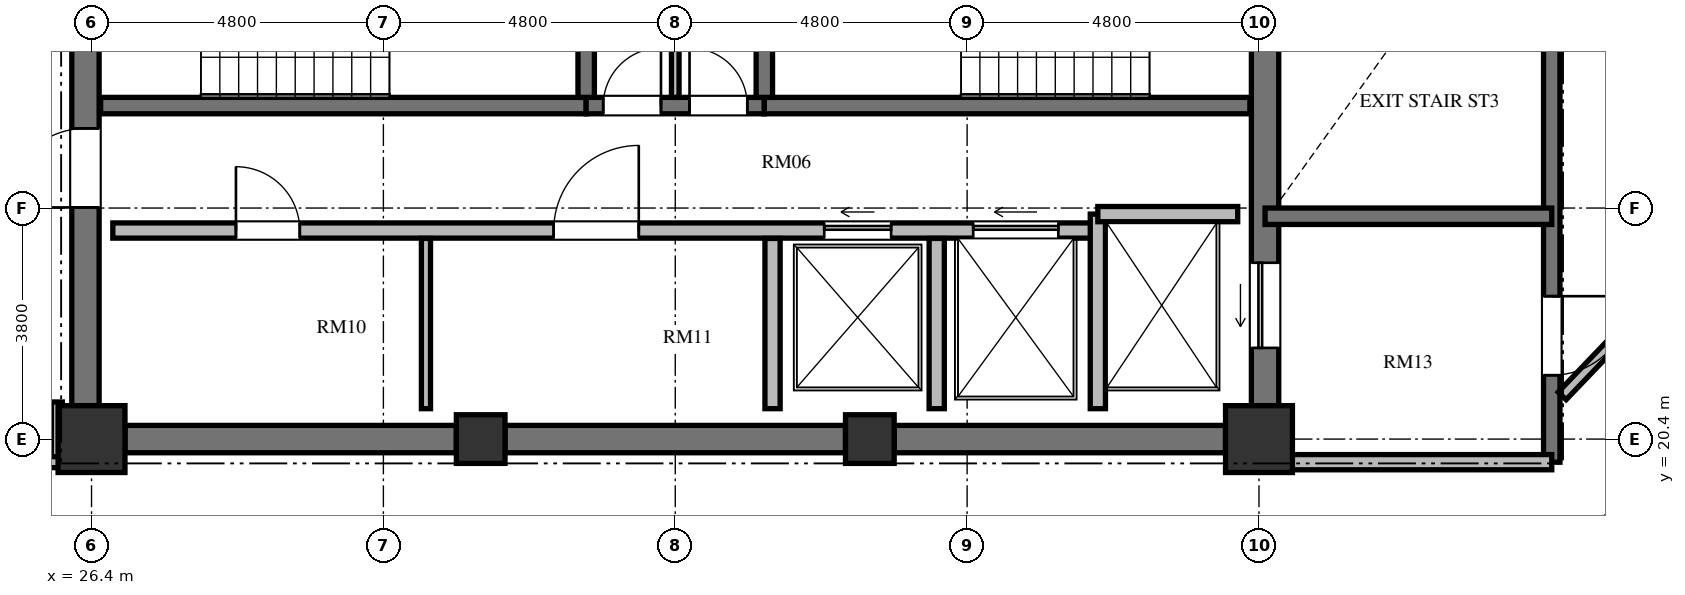
"""IFC4 building model, lengths in metres.
Left out: names, types, materials, properties, quantities, classifications, styles, units other than length and angle.
Written with IfcOpenShell. Run it as: python <this file> out.ifc"""

import sys

from ifc_helpers import new_model, si_unit, direction, frame, frame_2d, origin, origin_2d, place, context, subcontext, project, spatial, rectangle, extrude, element, fill, save


model = new_model("IFC4")
c1 = context("Model", 3, precision=1e-05, world=origin(), true_north=direction((0.0, 1.0)))
c2 = subcontext(c1, "Body", "Model", "MODEL_VIEW")
j1 = project(units=[si_unit("LENGTHUNIT", "METRE"), si_unit("PLANEANGLEUNIT", "RADIAN")], contexts=[c1])
p1 = place(None, origin())
s1 = spatial("IfcSite", under=j1, at=p1, CompositionType="ELEMENT")
p2 = place(p1, origin())
s2 = spatial("IfcBuilding", under=s1, at=p2, CompositionType="ELEMENT")
p3 = place(p2, frame((0.0, 0.0, 231.312)))
s3 = spatial("IfcBuildingStorey", under=s2, at=p3, CompositionType="ELEMENT", Elevation=231.312)
p4 = place(p3, frame((26.4, 20.4, 0.0), z_axis=(0.0, 0.0, 1.0), x_axis=(1.0, 0.0, 0.0)))
e1 = element("IfcColumn", 1, at=p4, inside=s3, PredefinedType="COLUMN", context=c2, shape_type="SweptSolid", body=[
    extrude(rectangle(XDim=1.1, YDim=1.1, at=origin_2d()), origin(), (0.0, 0.0, 1.0), 3.648),
])
for number, where, z_axis, x_axis in (
    (2, (32.8, 20.4, 0.0), (0.0, 0.0, 1.0), (1.0, 0.0, 0.0)),
    (3, (39.2, 20.4, 0.0), (0.0, 0.0, 1.0), (1.0, 0.0, 0.0)),
):
    element("IfcColumn", number, at=place(p3, frame(where, z_axis=z_axis, x_axis=x_axis)), inside=s3, PredefinedType="COLUMN", context=c2, shape_type="SweptSolid", body=[
        extrude(rectangle(XDim=0.8, YDim=0.8, at=origin_2d()), origin(), (0.0, 0.0, 1.0), 3.648),
    ])
p5 = place(p3, frame((45.6, 20.4, 0.0), z_axis=(0.0, 0.0, 1.0), x_axis=(1.0, 0.0, 0.0)))
e4 = element("IfcColumn", 4, at=p5, inside=s3, PredefinedType="COLUMN", context=c2, shape_type="SweptSolid", body=[
    extrude(rectangle(XDim=1.1, YDim=1.1, at=origin_2d()), origin(), (0.0, 0.0, 1.0), 3.648),
])
p6 = place(p3, frame((26.3, 20.95, 0.0), z_axis=(0.0, 0.0, 1.0), x_axis=(0.0, 1.0, 0.0)))
e5 = element("IfcWall", 5, at=p6, inside=s3, PredefinedType="SHEAR", context=c2, shape_type="SweptSolid", body=[
    extrude(rectangle(XDim=14.1, YDim=0.45, at=frame_2d((7.05, 0.0))), origin(), (0.0, 0.0, 1.0), 3.648),
])
p7 = place(p6, frame((6.5, 0.0, 0.0)))
e6 = element("IfcOpeningElement", 6, at=p7, cuts=e5, PredefinedType="OPENING", context=c2, shape_type="SweptSolid", body=[
    extrude(rectangle(XDim=1.2, YDim=2.15, at=frame_2d((0.6, 1.075))), frame((0.0, 0.235, 0.0), z_axis=(0.0, -1.0, 0.0), x_axis=(1.0, 0.0, 0.0)), (0.0, 0.0, 1.0), 0.47),
])
p8 = place(p6, frame((9.6, 0.0, 0.0)))
e7 = element("IfcOpeningElement", 7, at=p8, cuts=e5, PredefinedType="OPENING", context=c2, shape_type="SweptSolid", body=[
    extrude(rectangle(XDim=1.3, YDim=2.2, at=frame_2d((0.65, 1.1))), frame((0.0, 0.235, 0.0), z_axis=(0.0, -1.0, 0.0), x_axis=(1.0, 0.0, 0.0)), (0.0, 0.0, 1.0), 0.47),
])
p9 = place(p6, frame((3.26, 0.0, 0.0)))
e8 = element("IfcOpeningElement", 8, at=p9, cuts=e5, PredefinedType="OPENING", context=c2, shape_type="SweptSolid", body=[
    extrude(rectangle(XDim=1.3, YDim=2.2, at=frame_2d((0.65, 1.1))), frame((0.0, 0.235, 0.0), z_axis=(0.0, -1.0, 0.0), x_axis=(1.0, 0.0, 0.0)), (0.0, 0.0, 1.0), 0.47),
])
p10 = place(p3, frame((45.7, 20.95, 0.0), z_axis=(0.0, 0.0, 1.0), x_axis=(0.0, 1.0, 0.0)))
e9 = element("IfcWall", 9, at=p10, inside=s3, PredefinedType="SHEAR", context=c2, shape_type="SweptSolid", body=[
    extrude(rectangle(XDim=14.1, YDim=0.45, at=frame_2d((7.05, 0.0))), origin(), (0.0, 0.0, 1.0), 3.648),
])
p11 = place(p10, frame((11.75, 0.0, 0.0)))
e10 = element("IfcOpeningElement", 10, at=p11, cuts=e9, PredefinedType="OPENING", context=c2, shape_type="SweptSolid", body=[
    extrude(rectangle(XDim=1.4, YDim=2.3, at=frame_2d((0.7, 1.15))), frame((0.0, 0.235, 0.0), z_axis=(0.0, -1.0, 0.0), x_axis=(1.0, 0.0, 0.0)), (0.0, 0.0, 1.0), 0.47),
])
p12 = place(p10, frame((0.95, 0.0, 0.0)))
e11 = element("IfcOpeningElement", 11, at=p12, cuts=e9, PredefinedType="OPENING", context=c2, shape_type="SweptSolid", body=[
    extrude(rectangle(XDim=1.4, YDim=2.3, at=frame_2d((0.7, 1.15))), frame((0.0, 0.235, 0.0), z_axis=(0.0, -1.0, 0.0), x_axis=(1.0, 0.0, 0.0)), (0.0, 0.0, 1.0), 0.47),
])
p13 = place(p3, frame((26.95, 20.4, 0.0), z_axis=(0.0, 0.0, 1.0), x_axis=(1.0, 0.0, 0.0)))
e12 = element("IfcWall", 12, at=p13, inside=s3, PredefinedType="SHEAR", context=c2, shape_type="SweptSolid", body=[
    extrude(rectangle(XDim=5.45, YDim=0.45, at=frame_2d((2.725, 0.0))), origin(), (0.0, 0.0, 1.0), 3.648),
])
p14 = place(p3, frame((33.2, 20.4, 0.0), z_axis=(0.0, 0.0, 1.0), x_axis=(1.0, 0.0, 0.0)))
e13 = element("IfcWall", 13, at=p14, inside=s3, PredefinedType="SHEAR", context=c2, shape_type="SweptSolid", body=[
    extrude(rectangle(XDim=5.6, YDim=0.45, at=frame_2d((2.8, 0.0))), origin(), (0.0, 0.0, 1.0), 3.648),
])
p15 = place(p3, frame((39.6, 20.4, 0.0), z_axis=(0.0, 0.0, 1.0), x_axis=(1.0, 0.0, 0.0)))
e14 = element("IfcWall", 14, at=p15, inside=s3, PredefinedType="SHEAR", context=c2, shape_type="SweptSolid", body=[
    extrude(rectangle(XDim=5.45, YDim=0.45, at=frame_2d((2.725, 0.0))), origin(), (0.0, 0.0, 1.0), 3.648),
])
p16 = place(p3, frame((26.55, 25.885, 0.0), z_axis=(0.0, 0.0, 1.0), x_axis=(1.0, 0.0, 0.0)))
e15 = element("IfcWall", 15, at=p16, inside=s3, PredefinedType="SHEAR", context=c2, shape_type="SweptSolid", body=[
    extrude(rectangle(XDim=7.985, YDim=0.27, at=frame_2d((3.992, 0.0))), origin(), (0.0, 0.0, 1.0), 3.648),
])
p17 = place(p3, frame((34.535, 25.885, 0.0), z_axis=(0.0, 0.0, 1.0), x_axis=(1.0, 0.0, 0.0)))
e16 = element("IfcWall", 16, at=p17, inside=s3, PredefinedType="SHEAR", context=c2, shape_type="SweptSolid", body=[
    extrude(rectangle(XDim=2.93, YDim=0.27, at=frame_2d((1.465, 0.0))), origin(), (0.0, 0.0, 1.0), 3.648),
])
p18 = place(p17, frame((0.28, 0.0, 0.0)))
e17 = element("IfcOpeningElement", 17, at=p18, cuts=e16, PredefinedType="OPENING", context=c2, shape_type="SweptSolid", body=[
    extrude(rectangle(XDim=0.95, YDim=2.1, at=frame_2d((0.475, 1.05))), frame((0.0, 0.145, 0.0), z_axis=(0.0, -1.0, 0.0), x_axis=(1.0, 0.0, 0.0)), (0.0, 0.0, 1.0), 0.29),
])
p19 = place(p17, frame((1.7, 0.0, 0.0)))
e18 = element("IfcOpeningElement", 18, at=p19, cuts=e16, PredefinedType="OPENING", context=c2, shape_type="SweptSolid", body=[
    extrude(rectangle(XDim=0.95, YDim=2.1, at=frame_2d((0.475, 1.05))), frame((0.0, 0.145, 0.0), z_axis=(0.0, -1.0, 0.0), x_axis=(1.0, 0.0, 0.0)), (0.0, 0.0, 1.0), 0.29),
])
p20 = place(p3, frame((37.465, 25.885, 0.0), z_axis=(0.0, 0.0, 1.0), x_axis=(1.0, 0.0, 0.0)))
e19 = element("IfcWall", 19, at=p20, inside=s3, PredefinedType="SHEAR", context=c2, shape_type="SweptSolid", body=[
    extrude(rectangle(XDim=7.985, YDim=0.27, at=frame_2d((3.992, 0.0))), origin(), (0.0, 0.0, 1.0), 3.648),
])
for number, where, z_axis, x_axis in (
    (20, (34.535, 26.02, 0.0), (0.0, 0.0, 1.0), (0.0, 1.0, 0.0)),
    (21, (37.465, 26.02, 0.0), (0.0, 0.0, 1.0), (0.0, 1.0, 0.0)),
):
    element("IfcWall", number, at=place(p3, frame(where, z_axis=z_axis, x_axis=x_axis)), inside=s3, PredefinedType="SHEAR", context=c2, shape_type="SweptSolid", body=[
        extrude(rectangle(XDim=4.08, YDim=0.27, at=frame_2d((2.04, 0.0))), origin(), (0.0, 0.0, 1.0), 3.648),
    ])
p21 = place(p3, frame((36.0, 26.02, 0.0), z_axis=(0.0, 0.0, 1.0), x_axis=(0.0, 1.0, 0.0)))
e22 = element("IfcWall", 22, at=p21, inside=s3, PredefinedType="PARTITIONING", context=c2, shape_type="SweptSolid", body=[
    extrude(rectangle(XDim=4.08, YDim=0.125, at=frame_2d((2.04, 0.0))), origin(), (0.0, 0.0, 1.0), 3.448),
])
p22 = place(p3, frame((26.75, 23.83, 0.0), z_axis=(0.0, 0.0, 1.0), x_axis=(1.0, 0.0, 0.0)))
e23 = element("IfcWall", 23, at=p22, inside=s3, PredefinedType="SOLIDWALL", context=c2, shape_type="SweptSolid", body=[
    extrude(rectangle(XDim=16.2, YDim=0.25, at=frame_2d((8.1, 0.0))), origin(), (0.0, 0.0, 1.0), 3.448),
])
p23 = place(p22, frame((2.025, 0.0, 0.0)))
e24 = element("IfcOpeningElement", 24, at=p23, cuts=e23, PredefinedType="OPENING", context=c2, shape_type="SweptSolid", body=[
    extrude(rectangle(XDim=1.05, YDim=2.15, at=frame_2d((0.525, 1.075))), frame((0.0, 0.135, 0.0), z_axis=(0.0, -1.0, 0.0), x_axis=(1.0, 0.0, 0.0)), (0.0, 0.0, 1.0), 0.27),
])
p24 = place(p22, frame((7.25, 0.0, 0.0)))
e25 = element("IfcOpeningElement", 25, at=p24, cuts=e23, PredefinedType="OPENING", context=c2, shape_type="SweptSolid", body=[
    extrude(rectangle(XDim=1.4, YDim=2.2, at=frame_2d((0.7, 1.1))), frame((0.0, 0.135, 0.0), z_axis=(0.0, -1.0, 0.0), x_axis=(1.0, 0.0, 0.0)), (0.0, 0.0, 1.0), 0.27),
])
p25 = place(p22, frame((11.7, 0.0, 0.0)))
e26 = element("IfcOpeningElement", 26, at=p25, cuts=e23, PredefinedType="OPENING", context=c2, shape_type="SweptSolid", body=[
    extrude(rectangle(XDim=1.1, YDim=2.2, at=frame_2d((0.55, 1.1))), frame((0.0, 0.135, 0.0), z_axis=(0.0, -1.0, 0.0), x_axis=(1.0, 0.0, 0.0)), (0.0, 0.0, 1.0), 0.27),
])
p26 = place(p22, frame((14.15, 0.0, 0.0)))
e27 = element("IfcOpeningElement", 27, at=p26, cuts=e23, PredefinedType="OPENING", context=c2, shape_type="SweptSolid", body=[
    extrude(rectangle(XDim=1.4, YDim=2.3, at=frame_2d((0.7, 1.15))), frame((0.0, 0.135, 0.0), z_axis=(0.0, -1.0, 0.0), x_axis=(1.0, 0.0, 0.0)), (0.0, 0.0, 1.0), 0.27),
])
p27 = place(p3, frame((42.95, 20.9, 0.0), z_axis=(0.0, 0.0, 1.0), x_axis=(0.0, 1.0, 0.0)))
e28 = element("IfcWall", 28, at=p27, inside=s3, PredefinedType="SOLIDWALL", context=c2, shape_type="SweptSolid", body=[
    extrude(rectangle(XDim=3.2, YDim=0.25, at=frame_2d((1.6, 0.0))), origin(), (0.0, 0.0, 1.0), 3.448),
])
p28 = place(p3, frame((42.95, 24.1, 0.0), z_axis=(0.0, 0.0, 1.0), x_axis=(1.0, 0.0, 0.0)))
e29 = element("IfcWall", 29, at=p28, inside=s3, PredefinedType="SOLIDWALL", context=c2, shape_type="SweptSolid", body=[
    extrude(rectangle(XDim=2.3, YDim=0.25, at=frame_2d((1.15, 0.0))), origin(), (0.0, 0.0, 1.0), 3.448),
])
for number, where, z_axis, x_axis in (
    (30, (37.6, 20.9, 0.0), (0.0, 0.0, 1.0), (0.0, 1.0, 0.0)),
    (31, (40.3, 20.9, 0.0), (0.0, 0.0, 1.0), (0.0, 1.0, 0.0)),
):
    element("IfcWall", number, at=place(p3, frame(where, z_axis=z_axis, x_axis=x_axis)), inside=s3, PredefinedType="SOLIDWALL", context=c2, shape_type="SweptSolid", body=[
        extrude(rectangle(XDim=2.8, YDim=0.25, at=frame_2d((1.4, 0.0))), origin(), (0.0, 0.0, 1.0), 3.448),
    ])
p29 = place(p3, frame((31.9, 20.9, 0.0), z_axis=(0.0, 0.0, 1.0), x_axis=(0.0, 1.0, 0.0)))
e32 = element("IfcWall", 32, at=p29, inside=s3, PredefinedType="PARTITIONING", context=c2, shape_type="SweptSolid", body=[
    extrude(rectangle(XDim=2.8, YDim=0.15, at=frame_2d((1.4, 0.0))), origin(), (0.0, 0.0, 1.0), 3.448),
])
p30 = place(p3, frame((50.415, 35.845, 0.0), z_axis=(0.0, 0.0, 1.0), x_axis=(0.0, -1.0, 0.0)))
e33 = element("IfcWall", 33, at=p30, inside=s3, PredefinedType="SHEAR", context=c2, shape_type="SweptSolid", body=[
    extrude(rectangle(XDim=15.825, YDim=0.27, at=frame_2d((7.913, 0.0))), origin(), (0.0, 0.0, 1.0), 3.648),
])
p31 = place(p30, frame((4.445, 0.0, 0.0)))
e34 = element("IfcOpeningElement", 34, at=p31, cuts=e33, PredefinedType="OPENING", context=c2, shape_type="SweptSolid", body=[
    extrude(rectangle(XDim=1.2, YDim=2.15, at=frame_2d((0.6, 1.075))), frame((0.0, 0.145, 0.0), z_axis=(0.0, -1.0, 0.0), x_axis=(1.0, 0.0, 0.0)), (0.0, 0.0, 1.0), 0.29),
])
p32 = place(p30, frame((1.295, 0.0, 0.0)))
e35 = element("IfcOpeningElement", 35, at=p32, cuts=e33, PredefinedType="OPENING", context=c2, shape_type="SweptSolid", body=[
    extrude(rectangle(XDim=1.3, YDim=2.2, at=frame_2d((0.65, 1.1))), frame((0.0, 0.145, 0.0), z_axis=(0.0, -1.0, 0.0), x_axis=(1.0, 0.0, 0.0)), (0.0, 0.0, 1.0), 0.29),
])
p33 = place(p30, frame((13.095, 0.0, 0.0)))
e36 = element("IfcOpeningElement", 36, at=p33, cuts=e33, PredefinedType="OPENING", context=c2, shape_type="SweptSolid", body=[
    extrude(rectangle(XDim=1.3, YDim=2.2, at=frame_2d((0.65, 1.1))), frame((0.0, 0.145, 0.0), z_axis=(0.0, -1.0, 0.0), x_axis=(1.0, 0.0, 0.0)), (0.0, 0.0, 1.0), 0.29),
])
p34 = place(p3, frame((45.7, 24.065, 0.0), z_axis=(0.0, 0.0, 1.0), x_axis=(1.0, 0.0, 0.0)))
e37 = element("IfcWall", 37, at=p34, inside=s3, PredefinedType="SHEAR", context=c2, shape_type="SweptSolid", body=[
    extrude(rectangle(XDim=4.715, YDim=0.27, at=frame_2d((2.357, 0.0))), origin(), (0.0, 0.0, 1.0), 3.648),
])
p35 = place(p3, frame((45.7, 20.02, 0.0), z_axis=(0.0, 0.0, 1.0), x_axis=(1.0, 0.0, 0.0)))
e38 = element("IfcWall", 38, at=p35, inside=s3, PredefinedType="SOLIDWALL", context=c2, shape_type="SweptSolid", body=[
    extrude(rectangle(XDim=4.715, YDim=0.25, at=frame_2d((2.357, 0.0))), origin(), (0.0, 0.0, 1.0), 3.448),
])
p36 = place(p3, frame((53.078, 23.714, 0.0), z_axis=(0.0, 0.0, 1.0), x_axis=(-0.691353379446, -0.722516785085, 0.0)))
e39 = element("IfcWall", 39, at=p36, inside=s3, PredefinedType="PARTITIONING", context=c2, shape_type="SweptSolid", body=[
    extrude(rectangle(XDim=3.604, YDim=0.18, at=frame_2d((1.802, 0.0))), origin(), (0.0, 0.0, 1.0), 3.448),
])
p37 = place(p3, frame((25.83, 21.01, 0.0), z_axis=(0.0, 0.0, 1.0), x_axis=(0.0, -1.0, 0.0)))
e40 = element("IfcWall", 40, at=p37, inside=s3, PredefinedType="PARTITIONING", context=c2, shape_type="SweptSolid", body=[
    extrude(rectangle(XDim=1.03, YDim=0.18, at=frame_2d((0.515, 0.0))), origin(), (0.0, 0.0, 1.0), 3.448),
])
p38 = place(p3, frame((25.87, 20.02, 0.0), z_axis=(0.0, 0.0, 1.0), x_axis=(-1.0, 0.0, 0.0)))
e41 = element("IfcWall", 41, at=p38, inside=s3, PredefinedType="PARTITIONING", context=c2, shape_type="SweptSolid", body=[
    extrude(rectangle(XDim=2.56, YDim=0.18, at=frame_2d((1.28, 0.0))), origin(), (0.0, 0.0, 1.0), 3.448),
])
p39 = place(p18, origin())
e42 = element("IfcDoor", 42, at=p39, inside=s3, OperationType="SINGLE_SWING_RIGHT", PredefinedType="DOOR", context=c2, shape_type="SweptSolid", body=[
    extrude(rectangle(XDim=0.95, YDim=2.1, at=frame_2d((0.475, 1.05))), frame((0.0, 0.025, 0.0), z_axis=(0.0, -1.0, 0.0), x_axis=(1.0, 0.0, 0.0)), (0.0, 0.0, 1.0), 0.05),
])
fill(e17, e42)
p40 = place(p19, origin())
e43 = element("IfcDoor", 43, at=p40, inside=s3, OperationType="SINGLE_SWING_LEFT", PredefinedType="DOOR", context=c2, shape_type="SweptSolid", body=[
    extrude(rectangle(XDim=0.95, YDim=2.1, at=frame_2d((0.475, 1.05))), frame((0.0, 0.025, 0.0), z_axis=(0.0, -1.0, 0.0), x_axis=(1.0, 0.0, 0.0)), (0.0, 0.0, 1.0), 0.05),
])
fill(e18, e43)
p41 = place(p9, origin())
e44 = element("IfcDoor", 44, at=p41, inside=s3, OperationType="SINGLE_SWING_LEFT", PredefinedType="DOOR", context=c2, shape_type="SweptSolid", body=[
    extrude(rectangle(XDim=1.3, YDim=2.2, at=frame_2d((0.65, 1.1))), frame((0.0, 0.025, 0.0), z_axis=(0.0, -1.0, 0.0), x_axis=(1.0, 0.0, 0.0)), (0.0, 0.0, 1.0), 0.05),
])
fill(e8, e44)
p42 = place(p23, origin())
e45 = element("IfcDoor", 45, at=p42, inside=s3, OperationType="SINGLE_SWING_LEFT", PredefinedType="DOOR", context=c2, shape_type="SweptSolid", body=[
    extrude(rectangle(XDim=1.05, YDim=2.15, at=frame_2d((0.525, 1.075))), frame((0.0, 0.025, 0.0), z_axis=(0.0, -1.0, 0.0), x_axis=(1.0, 0.0, 0.0)), (0.0, 0.0, 1.0), 0.05),
])
fill(e24, e45)
p43 = place(p24, origin())
e46 = element("IfcDoor", 46, at=p43, inside=s3, OperationType="SINGLE_SWING_RIGHT", PredefinedType="DOOR", context=c2, shape_type="SweptSolid", body=[
    extrude(rectangle(XDim=1.4, YDim=2.2, at=frame_2d((0.7, 1.1))), frame((0.0, 0.025, 0.0), z_axis=(0.0, -1.0, 0.0), x_axis=(1.0, 0.0, 0.0)), (0.0, 0.0, 1.0), 0.05),
])
fill(e25, e46)
p44 = place(p25, origin())
e47 = element("IfcDoor", 47, at=p44, inside=s3, OperationType="SLIDING_TO_LEFT", PredefinedType="DOOR", context=c2, shape_type="SweptSolid", body=[
    extrude(rectangle(XDim=1.1, YDim=2.2, at=frame_2d((0.55, 1.1))), frame((0.0, 0.025, 0.0), z_axis=(0.0, -1.0, 0.0), x_axis=(1.0, 0.0, 0.0)), (0.0, 0.0, 1.0), 0.05),
])
fill(e26, e47)
p45 = place(p12, origin())
e48 = element("IfcDoor", 48, at=p45, inside=s3, OperationType="SLIDING_TO_LEFT", PredefinedType="DOOR", context=c2, shape_type="SweptSolid", body=[
    extrude(rectangle(XDim=1.4, YDim=2.3, at=frame_2d((0.7, 1.15))), frame((0.0, 0.025, 0.0), z_axis=(0.0, -1.0, 0.0), x_axis=(1.0, 0.0, 0.0)), (0.0, 0.0, 1.0), 0.05),
])
fill(e11, e48)
p46 = place(p26, origin())
e49 = element("IfcDoor", 49, at=p46, inside=s3, OperationType="SLIDING_TO_LEFT", PredefinedType="DOOR", context=c2, shape_type="SweptSolid", body=[
    extrude(rectangle(XDim=1.4, YDim=2.3, at=frame_2d((0.7, 1.15))), frame((0.0, 0.025, 0.0), z_axis=(0.0, -1.0, 0.0), x_axis=(1.0, 0.0, 0.0)), (0.0, 0.0, 1.0), 0.05),
])
fill(e27, e49)
p47 = place(p33, origin())
e50 = element("IfcDoor", 50, at=p47, inside=s3, OperationType="SINGLE_SWING_LEFT", PredefinedType="DOOR", context=c2, shape_type="SweptSolid", body=[
    extrude(rectangle(XDim=1.3, YDim=2.2, at=frame_2d((0.65, 1.1))), frame((0.0, 0.025, 0.0), z_axis=(0.0, -1.0, 0.0), x_axis=(1.0, 0.0, 0.0)), (0.0, 0.0, 1.0), 0.05),
])
fill(e36, e50)
save(model, sys.argv[1])
